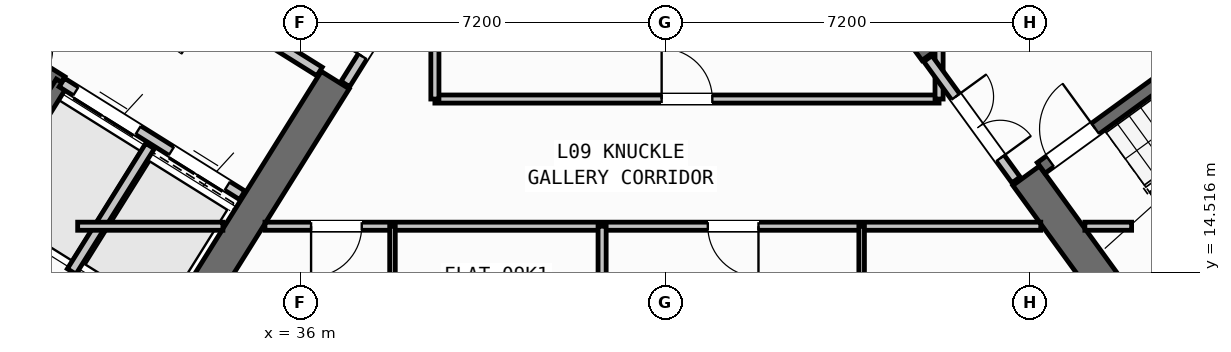
"""IFC4 building model, lengths in metres.
Left out: names, types, materials, properties, quantities, classifications, styles, units other than length and angle.
Written with IfcOpenShell. Run it as: python <this file> out.ifc"""

import sys

from ifc_helpers import new_model, si_unit, direction, frame, frame_2d, origin, place, context, subcontext, project, spatial, rectangle, extrude, source, transform, mapped, element, fill, save


model = new_model("IFC4")
c1 = context("Model", 3, precision=1e-05, world=origin(), true_north=direction((0.0, 1.0)))
c2 = subcontext(c1, "Body", "Model", "MODEL_VIEW")
j1 = project(units=[si_unit("LENGTHUNIT", "METRE"), si_unit("PLANEANGLEUNIT", "RADIAN")], contexts=[c1])
p1 = place(None, origin())
s1 = spatial("IfcSite", under=j1, at=p1, CompositionType="ELEMENT")
p2 = place(p1, origin())
s2 = spatial("IfcBuilding", under=s1, at=p2, CompositionType="ELEMENT")
p3 = place(p2, frame((0.0, 0.0, 38.4)))
s3 = spatial("IfcBuildingStorey", under=s2, at=p3, CompositionType="ELEMENT", Elevation=38.4)
p4 = place(p3, frame((33.409, 12.45, 0.0), z_axis=(0.0, 0.0, 1.0), x_axis=(-0.848051132073, 0.529914405721, 0.0)))
e1 = element("IfcWall", 1, at=p4, inside=s3, PredefinedType="SHEAR", context=c2, shape_type="SweptSolid", body=[
    extrude(rectangle(XDim=13.24, YDim=0.65, at=frame_2d((6.62, 0.0))), origin(), (0.0, 0.0, 1.0), 3.35),
])
p5 = place(p3, frame((36.683, 18.304, 0.0), z_axis=(0.0, 0.0, 1.0), x_axis=(-0.529899109053, -0.848060690178, 0.0)))
e2 = element("IfcWall", 2, at=p5, inside=s3, PredefinedType="SHEAR", context=c2, shape_type="SweptSolid", body=[
    extrude(rectangle(XDim=6.375, YDim=0.65, at=frame_2d((3.188, 0.0))), origin(), (0.0, 0.0, 1.0), 3.35),
])
p6 = place(p3, frame((52.318, 13.11, 0.0), z_axis=(0.0, 0.0, 1.0), x_axis=(0.809019445368, 0.587781878776, 0.0)))
e3 = element("IfcWall", 3, at=p6, inside=s3, PredefinedType="SHEAR", context=c2, shape_type="SweptSolid", body=[
    extrude(rectangle(XDim=12.44, YDim=0.65, at=frame_2d((6.22, 0.0))), origin(), (0.0, 0.0, 1.0), 3.35),
])
p7 = place(p3, frame((52.39, 13.564, 0.0), z_axis=(0.0, 0.0, 1.0), x_axis=(-0.58779688989, 0.809008539037, 0.0)))
e4 = element("IfcWall", 4, at=p7, inside=s3, PredefinedType="SHEAR", context=c2, shape_type="SweptSolid", body=[
    extrude(rectangle(XDim=3.525, YDim=0.65, at=frame_2d((1.763, 0.0))), origin(), (0.0, 0.0, 1.0), 3.35),
])
p8 = place(p3, frame((48.526, 18.884, 0.0), z_axis=(0.0, 0.0, 1.0), x_axis=(-0.58777996584, 0.809020835181, 0.0)))
e5 = element("IfcWall", 5, at=p8, inside=s3, PredefinedType="SHEAR", context=c2, shape_type="SweptSolid", body=[
    extrude(rectangle(XDim=6.375, YDim=0.65, at=frame_2d((3.188, 0.0))), origin(), (0.0, 0.0, 1.0), 3.35),
])
p9 = place(p3, frame((31.28, 18.261, 0.0), z_axis=(0.0, 0.0, 1.0), x_axis=(-0.848051618787, 0.529913626805, 0.0)))
e6 = element("IfcWall", 6, at=p9, inside=s3, PredefinedType="SHEAR", context=c2, shape_type="SweptSolid", body=[
    extrude(rectangle(XDim=7.46, YDim=0.26, at=frame_2d((3.73, 0.0))), origin(), (0.0, 0.0, 1.0), 3.35),
])
p10 = place(p9, frame((0.36, 0.0, 0.0)))
e7 = element("IfcOpeningElement", 7, at=p10, cuts=e6, PredefinedType="OPENING", context=c2, shape_type="SweptSolid", body=[
    extrude(rectangle(XDim=0.86, YDim=2.05, at=frame_2d((0.43, 1.025))), frame((0.0, 0.14, 0.0), z_axis=(0.0, -1.0, 0.0), x_axis=(1.0, 0.0, 0.0)), (0.0, 0.0, 1.0), 0.28),
])
p11 = place(p3, frame((31.288, 18.256, 0.0), z_axis=(0.0, 0.0, 1.0), x_axis=(-0.529943379326, -0.848033026897, 0.0)))
e8 = element("IfcWall", 8, at=p11, inside=s3, PredefinedType="SHEAR", context=c2, shape_type="SweptSolid", body=[
    extrude(rectangle(XDim=3.16, YDim=0.26, at=frame_2d((1.58, 0.0))), origin(), (0.0, 0.0, 1.0), 3.35),
])
p12 = place(p3, frame((34.848, 16.031, 0.0), z_axis=(0.0, 0.0, 1.0), x_axis=(-0.848044042236, 0.529925751807, 0.0)))
e9 = element("IfcWall", 9, at=p12, inside=s3, PredefinedType="STANDARD", context=c2, shape_type="SweptSolid", body=[
    extrude(rectangle(XDim=4.198, YDim=0.2, at=frame_2d((2.099, 0.0))), origin(), (0.0, 0.0, 1.0), 3.34),
])
p13 = place(p12, frame((0.348, 0.0, 0.0)))
e10 = element("IfcOpeningElement", 10, at=p13, cuts=e9, PredefinedType="OPENING", context=c2, shape_type="SweptSolid", body=[
    extrude(rectangle(XDim=1.3, YDim=2.2, at=frame_2d((0.65, 1.1))), frame((0.0, 0.11, 0.0), z_axis=(0.0, -1.0, 0.0), x_axis=(1.0, 0.0, 0.0)), (0.0, 0.0, 1.0), 0.22),
])
p14 = place(p12, frame((2.423, 0.0, 0.0)))
e11 = element("IfcOpeningElement", 11, at=p14, cuts=e9, PredefinedType="OPENING", context=c2, shape_type="SweptSolid", body=[
    extrude(rectangle(XDim=1.45, YDim=2.25, at=frame_2d((0.725, 1.125))), frame((0.0, 0.11, 0.0), z_axis=(0.0, -1.0, 0.0), x_axis=(1.0, 0.0, 0.0)), (0.0, 0.0, 1.0), 0.22),
])
p15 = place(p3, frame((36.374, 18.474, 0.0), z_axis=(0.0, 0.0, 1.0), x_axis=(-0.848051071577, 0.529914502535, 0.0)))
e12 = element("IfcWall", 12, at=p15, inside=s3, PredefinedType="STANDARD", context=c2, shape_type="SweptSolid", body=[
    extrude(rectangle(XDim=5.718, YDim=0.2, at=frame_2d((2.859, 0.0))), origin(), (0.0, 0.0, 1.0), 3.34),
])
p16 = place(p15, frame((2.498, 0.0, 0.0)))
e13 = element("IfcOpeningElement", 13, at=p16, cuts=e12, PredefinedType="OPENING", context=c2, shape_type="SweptSolid", body=[
    extrude(rectangle(XDim=1.15, YDim=2.1, at=frame_2d((0.575, 1.05))), frame((0.0, 0.11, 0.0), z_axis=(0.0, -1.0, 0.0), x_axis=(1.0, 0.0, 0.0)), (0.0, 0.0, 1.0), 0.22),
])
p17 = place(p3, frame((33.029, 17.003, 0.0), z_axis=(0.0, 0.0, 1.0), x_axis=(-0.529916267533, -0.848049968695, 0.0)))
e14 = element("IfcWall", 14, at=p17, inside=s3, PredefinedType="STANDARD", context=c2, shape_type="SweptSolid", body=[
    extrude(rectangle(XDim=2.92, YDim=0.2, at=frame_2d((1.46, 0.0))), origin(), (0.0, 0.0, 1.0), 3.34),
])
p18 = place(p3, frame((52.472, 14.013, 0.0), z_axis=(0.0, 0.0, 1.0), x_axis=(0.809028366311, 0.587769599847, 0.0)))
e15 = element("IfcWall", 15, at=p18, inside=s3, PredefinedType="SHEAR", context=c2, shape_type="SweptSolid", body=[
    extrude(rectangle(XDim=7.33, YDim=0.26, at=frame_2d((3.665, 0.0))), origin(), (0.0, 0.0, 1.0), 3.35),
])
p19 = place(p3, frame((50.615, 16.57, 0.0), z_axis=(0.0, 0.0, 1.0), x_axis=(0.809028366311, 0.587769599847, 0.0)))
e16 = element("IfcWall", 16, at=p19, inside=s3, PredefinedType="SHEAR", context=c2, shape_type="SweptSolid", body=[
    extrude(rectangle(XDim=7.33, YDim=0.26, at=frame_2d((3.665, 0.0))), origin(), (0.0, 0.0, 1.0), 3.35),
])
p20 = place(p19, frame((0.22, 0.0, 0.0)))
e17 = element("IfcOpeningElement", 17, at=p20, cuts=e16, PredefinedType="OPENING", context=c2, shape_type="SweptSolid", body=[
    extrude(rectangle(XDim=1.1, YDim=2.1, at=frame_2d((0.55, 1.05))), frame((0.0, 0.14, 0.0), z_axis=(0.0, -1.0, 0.0), x_axis=(1.0, 0.0, 0.0)), (0.0, 0.0, 1.0), 0.28),
])
p21 = place(p3, frame((32.164, 10.374, 0.0), z_axis=(0.0, 0.0, 1.0), x_axis=(-0.848044107957, 0.529925646633, 0.0)))
e18 = element("IfcWall", 18, at=p21, inside=s3, PredefinedType="PARTITIONING", context=c2, shape_type="SweptSolid", body=[
    extrude(rectangle(XDim=15.57, YDim=0.16, at=frame_2d((7.785, 0.0))), origin(), (0.0, 0.0, 1.0), 3.34),
])
p22 = place(p21, frame((10.83, 0.0, 0.0)))
e19 = element("IfcOpeningElement", 19, at=p22, cuts=e18, PredefinedType="OPENING", context=c2, shape_type="SweptSolid", body=[
    extrude(rectangle(XDim=1.0, YDim=2.1, at=frame_2d((0.5, 1.05))), frame((0.0, 0.09, 0.0), z_axis=(0.0, -1.0, 0.0), x_axis=(1.0, 0.0, 0.0)), (0.0, 0.0, 1.0), 0.18),
])
p23 = place(p3, frame((38.451, 20.737, 0.0), z_axis=(0.0, 0.0, 1.0), x_axis=(-0.529924799939, -0.848044637038, 0.0)))
e20 = element("IfcWall", 20, at=p23, inside=s3, PredefinedType="STANDARD", context=c2, shape_type="SweptSolid", body=[
    extrude(rectangle(XDim=2.96, YDim=0.2, at=frame_2d((1.48, 0.0))), origin(), (0.0, 0.0, 1.0), 3.34),
])
p24 = place(p23, frame((1.46, 0.0, 0.0)))
e21 = element("IfcOpeningElement", 21, at=p24, cuts=e20, PredefinedType="OPENING", context=c2, shape_type="SweptSolid", body=[
    extrude(rectangle(XDim=0.86, YDim=2.05, at=frame_2d((0.43, 1.025))), frame((0.0, 0.11, 0.0), z_axis=(0.0, -1.0, 0.0), x_axis=(1.0, 0.0, 0.0)), (0.0, 0.0, 1.0), 0.22),
])
p25 = place(p3, frame((31.6, 15.42, 0.0), z_axis=(0.0, 0.0, 1.0), x_axis=(1.0, 0.0, 0.0)))
e22 = element("IfcWall", 22, at=p25, inside=s3, PredefinedType="PARTITIONING", context=c2, shape_type="SweptSolid", body=[
    extrude(rectangle(XDim=2.866, YDim=0.16, at=frame_2d((1.433, 0.0))), origin(), (0.0, 0.0, 1.0), 3.34),
])
p26 = place(p3, frame((35.296, 15.42, 0.0), z_axis=(0.0, 0.0, 1.0), x_axis=(1.0, 0.0, 0.0)))
e23 = element("IfcWall", 23, at=p26, inside=s3, PredefinedType="PARTITIONING", context=c2, shape_type="SweptSolid", body=[
    extrude(rectangle(XDim=15.311, YDim=0.16, at=frame_2d((7.655, 0.0))), origin(), (0.0, 0.0, 1.0), 3.34),
])
p27 = place(p26, frame((0.91, 0.0, 0.0)))
e24 = element("IfcOpeningElement", 24, at=p27, cuts=e23, PredefinedType="OPENING", context=c2, shape_type="SweptSolid", body=[
    extrude(rectangle(XDim=1.0, YDim=2.1, at=frame_2d((0.5, 1.05))), frame((0.0, 0.09, 0.0), z_axis=(0.0, -1.0, 0.0), x_axis=(1.0, 0.0, 0.0)), (0.0, 0.0, 1.0), 0.18),
])
p28 = place(p26, frame((8.74, 0.0, 0.0)))
e25 = element("IfcOpeningElement", 25, at=p28, cuts=e23, PredefinedType="OPENING", context=c2, shape_type="SweptSolid", body=[
    extrude(rectangle(XDim=1.0, YDim=2.1, at=frame_2d((0.5, 1.05))), frame((0.0, 0.09, 0.0), z_axis=(0.0, -1.0, 0.0), x_axis=(1.0, 0.0, 0.0)), (0.0, 0.0, 1.0), 0.18),
])
p29 = place(p3, frame((51.477, 15.42, 0.0), z_axis=(0.0, 0.0, 1.0), x_axis=(1.0, 0.0, 0.0)))
e26 = element("IfcWall", 26, at=p29, inside=s3, PredefinedType="PARTITIONING", context=c2, shape_type="SweptSolid", body=[
    extrude(rectangle(XDim=0.923, YDim=0.16, at=frame_2d((0.461, 0.0))), origin(), (0.0, 0.0, 1.0), 3.34),
])
p30 = place(p3, frame((38.65, 17.93, 0.0), z_axis=(0.0, 0.0, 1.0), x_axis=(1.0, 0.0, 0.0)))
e27 = element("IfcWall", 27, at=p30, inside=s3, PredefinedType="PARTITIONING", context=c2, shape_type="SweptSolid", body=[
    extrude(rectangle(XDim=9.95, YDim=0.16, at=frame_2d((4.975, 0.0))), origin(), (0.0, 0.0, 1.0), 3.34),
])
p31 = place(p30, frame((4.475, 0.0, 0.0)))
e28 = element("IfcOpeningElement", 28, at=p31, cuts=e27, PredefinedType="OPENING", context=c2, shape_type="SweptSolid", body=[
    extrude(rectangle(XDim=1.0, YDim=2.1, at=frame_2d((0.5, 1.05))), frame((0.0, 0.09, 0.0), z_axis=(0.0, -1.0, 0.0), x_axis=(1.0, 0.0, 0.0)), (0.0, 0.0, 1.0), 0.18),
])
p32 = place(p3, frame((38.65, 17.93, 0.0), z_axis=(0.0, 0.0, 1.0), x_axis=(0.0, 1.0, 0.0)))
e29 = element("IfcWall", 29, at=p32, inside=s3, PredefinedType="PARTITIONING", context=c2, shape_type="SweptSolid", body=[
    extrude(rectangle(XDim=2.857, YDim=0.16, at=frame_2d((1.428, 0.0))), origin(), (0.0, 0.0, 1.0), 3.34),
])
p33 = place(p3, frame((48.6, 17.93, 0.0), z_axis=(0.0, 0.0, 1.0), x_axis=(0.0, 1.0, 0.0)))
e30 = element("IfcWall", 30, at=p33, inside=s3, PredefinedType="PARTITIONING", context=c2, shape_type="SweptSolid", body=[
    extrude(rectangle(XDim=0.993, YDim=0.16, at=frame_2d((0.496, 0.0))), origin(), (0.0, 0.0, 1.0), 3.34),
])
p34 = place(p3, frame((50.119, 16.333, 0.0), z_axis=(0.0, 0.0, 1.0), x_axis=(-0.587749856981, 0.809042709391, 0.0)))
e31 = element("IfcWall", 31, at=p34, inside=s3, PredefinedType="STANDARD", context=c2, shape_type="SweptSolid", body=[
    extrude(rectangle(XDim=2.96, YDim=0.2, at=frame_2d((1.48, 0.0))), origin(), (0.0, 0.0, 1.0), 3.34),
])
p35 = place(p34, frame((0.53, 0.0, 0.0)))
e32 = element("IfcOpeningElement", 32, at=p35, cuts=e31, PredefinedType="OPENING", context=c2, shape_type="SweptSolid", body=[
    extrude(rectangle(XDim=1.5, YDim=2.15, at=frame_2d((0.75, 1.075))), frame((0.0, 0.11, 0.0), z_axis=(0.0, -1.0, 0.0), x_axis=(1.0, 0.0, 0.0)), (0.0, 0.0, 1.0), 0.22),
])
p36 = place(p3, frame((41.95, 1.96, 0.0), z_axis=(0.0, 0.0, 1.0), x_axis=(0.0, 1.0, 0.0)))
e33 = element("IfcWall", 33, at=p36, inside=s3, PredefinedType="PARTITIONING", context=c2, shape_type="SweptSolid", body=[
    extrude(rectangle(XDim=13.46, YDim=0.16, at=frame_2d((6.73, 0.0))), origin(), (0.0, 0.0, 1.0), 3.34),
])
p37 = place(p3, frame((37.813, 1.96, 0.0), z_axis=(0.0, 0.0, 1.0), x_axis=(0.0, 1.0, 0.0)))
e34 = element("IfcWall", 34, at=p37, inside=s3, PredefinedType="PARTITIONING", context=c2, shape_type="SweptSolid", body=[
    extrude(rectangle(XDim=13.46, YDim=0.11, at=frame_2d((6.73, 0.0))), origin(), (0.0, 0.0, 1.0), 3.34),
])
p38 = place(p37, frame((5.5, 0.0, 0.0)))
e35 = element("IfcOpeningElement", 35, at=p38, cuts=e34, PredefinedType="OPENING", context=c2, shape_type="SweptSolid", body=[
    extrude(rectangle(XDim=0.92, YDim=2.08, at=frame_2d((0.46, 1.04))), frame((0.0, 0.065, 0.0), z_axis=(0.0, -1.0, 0.0), x_axis=(1.0, 0.0, 0.0)), (0.0, 0.0, 1.0), 0.13),
])
p39 = place(p37, frame((10.67, 0.0, 0.0)))
e36 = element("IfcOpeningElement", 36, at=p39, cuts=e34, PredefinedType="OPENING", context=c2, shape_type="SweptSolid", body=[
    extrude(rectangle(XDim=0.88, YDim=2.08, at=frame_2d((0.44, 1.04))), frame((0.0, 0.065, 0.0), z_axis=(0.0, -1.0, 0.0), x_axis=(1.0, 0.0, 0.0)), (0.0, 0.0, 1.0), 0.13),
])
p40 = place(p3, frame((47.072, 1.96, 0.0), z_axis=(0.0, 0.0, 1.0), x_axis=(0.0, 1.0, 0.0)))
e37 = element("IfcWall", 37, at=p40, inside=s3, PredefinedType="PARTITIONING", context=c2, shape_type="SweptSolid", body=[
    extrude(rectangle(XDim=13.46, YDim=0.11, at=frame_2d((6.73, 0.0))), origin(), (0.0, 0.0, 1.0), 3.34),
])
p41 = place(p40, frame((6.6, 0.0, 0.0)))
e38 = element("IfcOpeningElement", 38, at=p41, cuts=e37, PredefinedType="OPENING", context=c2, shape_type="SweptSolid", body=[
    extrude(rectangle(XDim=0.92, YDim=2.08, at=frame_2d((0.46, 1.04))), frame((0.0, 0.065, 0.0), z_axis=(0.0, -1.0, 0.0), x_axis=(1.0, 0.0, 0.0)), (0.0, 0.0, 1.0), 0.13),
])
p42 = place(p40, frame((11.32, 0.0, 0.0)))
e39 = element("IfcOpeningElement", 39, at=p42, cuts=e37, PredefinedType="OPENING", context=c2, shape_type="SweptSolid", body=[
    extrude(rectangle(XDim=0.88, YDim=2.08, at=frame_2d((0.44, 1.04))), frame((0.0, 0.065, 0.0), z_axis=(0.0, -1.0, 0.0), x_axis=(1.0, 0.0, 0.0)), (0.0, 0.0, 1.0), 0.13),
])
m1 = source(origin(), c2, "Body", "SweptSolid", [
    extrude(rectangle(XDim=1.3, YDim=2.2, at=frame_2d((0.65, 1.1))), frame((0.0, 0.025, 0.0), z_axis=(0.0, -1.0, 0.0), x_axis=(1.0, 0.0, 0.0)), (0.0, 0.0, 1.0), 0.05),
])
p43 = place(p13, origin())
e40 = element("IfcDoor", 40, at=p43, inside=s3, OperationType="DOUBLE_DOOR_SLIDING", PredefinedType="DOOR", context=c2, shape_type="MappedRepresentation", body=[
    mapped(m1, transform((0.0, 0.0, 0.0), scale=1.0)),
])
fill(e10, e40)
m2 = source(origin(), c2, "Body", "SweptSolid", [
    extrude(rectangle(XDim=1.45, YDim=2.25, at=frame_2d((0.725, 1.125))), frame((0.0, 0.025, 0.0), z_axis=(0.0, -1.0, 0.0), x_axis=(1.0, 0.0, 0.0)), (0.0, 0.0, 1.0), 0.05),
])
p44 = place(p14, origin())
e41 = element("IfcDoor", 41, at=p44, inside=s3, OperationType="DOUBLE_DOOR_SLIDING", PredefinedType="DOOR", context=c2, shape_type="MappedRepresentation", body=[
    mapped(m2, transform((0.0, 0.0, 0.0), scale=1.0)),
])
fill(e11, e41)
m3 = source(origin(), c2, "Body", "SweptSolid", [
    extrude(rectangle(XDim=1.1, YDim=2.1, at=frame_2d((0.55, 1.05))), frame((0.0, 0.025, 0.0), z_axis=(0.0, -1.0, 0.0), x_axis=(1.0, 0.0, 0.0)), (0.0, 0.0, 1.0), 0.05),
])
p45 = place(p20, origin())
e42 = element("IfcDoor", 42, at=p45, inside=s3, OperationType="SINGLE_SWING_RIGHT", PredefinedType="DOOR", context=c2, shape_type="MappedRepresentation", body=[
    mapped(m3, transform((0.0, 0.0, 0.0), scale=1.0)),
])
fill(e17, e42)
m4 = source(origin(), c2, "Body", "SweptSolid", [
    extrude(rectangle(XDim=1.0, YDim=2.1, at=frame_2d((0.5, 1.05))), frame((0.0, 0.025, 0.0), z_axis=(0.0, -1.0, 0.0), x_axis=(1.0, 0.0, 0.0)), (0.0, 0.0, 1.0), 0.05),
])
p46 = place(p31, origin())
e43 = element("IfcDoor", 43, at=p46, inside=s3, OperationType="SINGLE_SWING_LEFT", PredefinedType="DOOR", context=c2, shape_type="MappedRepresentation", body=[
    mapped(m4, transform((0.0, 0.0, 0.0), scale=1.0)),
])
fill(e28, e43)
m5 = source(origin(), c2, "Body", "SweptSolid", [
    extrude(rectangle(XDim=0.86, YDim=2.05, at=frame_2d((0.43, 1.025))), frame((0.0, 0.025, 0.0), z_axis=(0.0, -1.0, 0.0), x_axis=(1.0, 0.0, 0.0)), (0.0, 0.0, 1.0), 0.05),
])
p47 = place(p24, frame((0.86, 0.0, 0.0), z_axis=(0.0, 0.0, 1.0), x_axis=(-1.0, 0.0, 0.0)))
e44 = element("IfcDoor", 44, at=p47, inside=s3, OperationType="SINGLE_SWING_LEFT", PredefinedType="DOOR", context=c2, shape_type="MappedRepresentation", body=[
    mapped(m5, transform((0.0, 0.0, 0.0), scale=1.0)),
])
fill(e21, e44)
m6 = source(origin(), c2, "Body", "SweptSolid", [
    extrude(rectangle(XDim=1.5, YDim=2.15, at=frame_2d((0.75, 1.075))), frame((0.0, 0.025, 0.0), z_axis=(0.0, -1.0, 0.0), x_axis=(1.0, 0.0, 0.0)), (0.0, 0.0, 1.0), 0.05),
])
p48 = place(p35, frame((1.5, 0.0, 0.0), z_axis=(0.0, 0.0, 1.0), x_axis=(-1.0, 0.0, 0.0)))
e45 = element("IfcDoor", 45, at=p48, inside=s3, OperationType="DOUBLE_DOOR_SINGLE_SWING", PredefinedType="DOOR", context=c2, shape_type="MappedRepresentation", body=[
    mapped(m6, transform((0.0, 0.0, 0.0), scale=1.0)),
])
fill(e32, e45)
p49 = place(p27, frame((1.0, 0.0, 0.0), z_axis=(0.0, 0.0, 1.0), x_axis=(-1.0, 0.0, 0.0)))
e46 = element("IfcDoor", 46, at=p49, inside=s3, OperationType="SINGLE_SWING_RIGHT", PredefinedType="DOOR", context=c2, shape_type="MappedRepresentation", body=[
    mapped(m4, transform((0.0, 0.0, 0.0), scale=1.0)),
])
fill(e24, e46)
p50 = place(p28, frame((1.0, 0.0, 0.0), z_axis=(0.0, 0.0, 1.0), x_axis=(-1.0, 0.0, 0.0)))
e47 = element("IfcDoor", 47, at=p50, inside=s3, OperationType="SINGLE_SWING_LEFT", PredefinedType="DOOR", context=c2, shape_type="MappedRepresentation", body=[
    mapped(m4, transform((0.0, 0.0, 0.0), scale=1.0)),
])
fill(e25, e47)
save(model, sys.argv[1])
